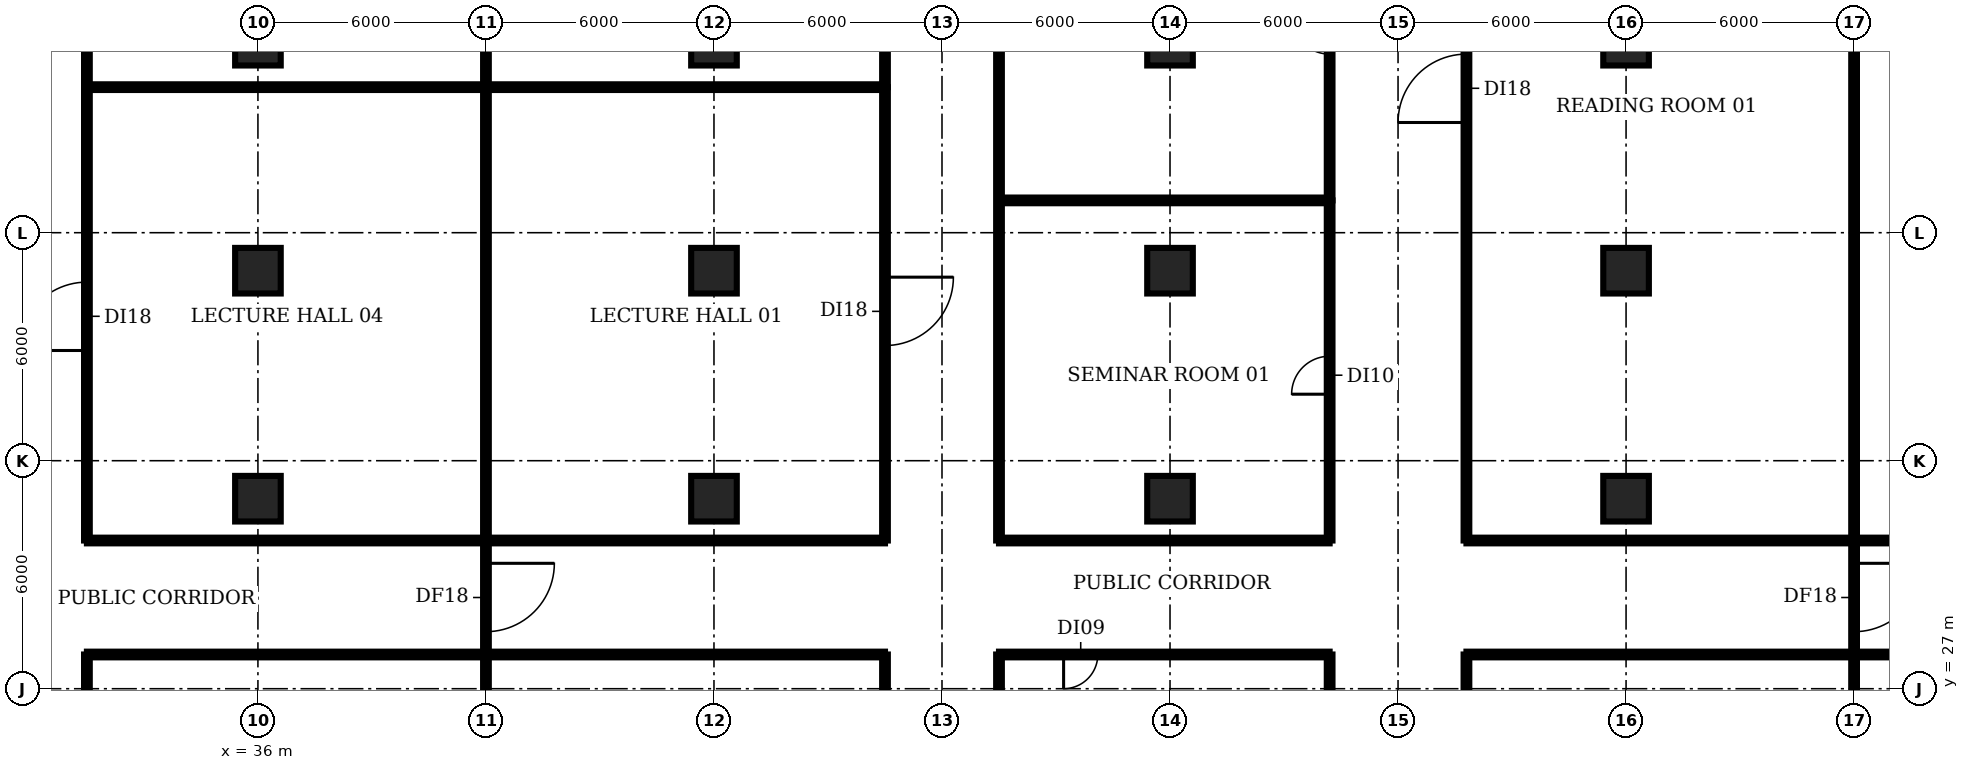
"""IFC4 building model, lengths in metres.
Left out: names, types, materials, properties, quantities, classifications, styles, units other than length and angle.
Written with IfcOpenShell. Run it as: python <this file> out.ifc"""

import sys

from ifc_helpers import new_model, si_unit, direction, frame, frame_2d, origin, origin_2d, place, context, subcontext, project, spatial, rectangle, extrude, element, fill, save


model = new_model("IFC4")
c1 = context("Model", 3, precision=1e-05, world=origin(), true_north=direction((0.0, 1.0)))
c2 = subcontext(c1, "Body", "Model", "MODEL_VIEW")
j1 = project(units=[si_unit("LENGTHUNIT", "METRE"), si_unit("PLANEANGLEUNIT", "RADIAN")], contexts=[c1])
p1 = place(None, origin())
s1 = spatial("IfcSite", under=j1, at=p1, CompositionType="ELEMENT")
p2 = place(p1, origin())
s2 = spatial("IfcBuilding", under=s1, at=p2, CompositionType="ELEMENT")
p3 = place(p2, frame((0.0, 0.0, 6.0)))
s3 = spatial("IfcBuildingStorey", under=s2, at=p3, CompositionType="ELEMENT", Elevation=6.0)
for number, where, z_axis, x_axis in (
    (1, (36.0, 32.0, 0.0), (0.0, 0.0, 1.0), (1.0, 0.0, 0.0)),
    (2, (36.0, 38.0, 0.0), (0.0, 0.0, 1.0), (1.0, 0.0, 0.0)),
    (3, (36.0, 44.0, 0.0), (0.0, 0.0, 1.0), (1.0, 0.0, 0.0)),
    (4, (48.0, 32.0, 0.0), (0.0, 0.0, 1.0), (1.0, 0.0, 0.0)),
    (5, (48.0, 38.0, 0.0), (0.0, 0.0, 1.0), (1.0, 0.0, 0.0)),
    (6, (48.0, 44.0, 0.0), (0.0, 0.0, 1.0), (1.0, 0.0, 0.0)),
    (7, (60.0, 32.0, 0.0), (0.0, 0.0, 1.0), (1.0, 0.0, 0.0)),
    (8, (60.0, 38.0, 0.0), (0.0, 0.0, 1.0), (1.0, 0.0, 0.0)),
    (9, (60.0, 44.0, 0.0), (0.0, 0.0, 1.0), (1.0, 0.0, 0.0)),
    (10, (72.0, 32.0, 0.0), (0.0, 0.0, 1.0), (1.0, 0.0, 0.0)),
    (11, (72.0, 38.0, 0.0), (0.0, 0.0, 1.0), (1.0, 0.0, 0.0)),
    (12, (72.0, 44.0, 0.0), (0.0, 0.0, 1.0), (1.0, 0.0, 0.0)),
):
    element("IfcColumn", number, at=place(p3, frame(where, z_axis=z_axis, x_axis=x_axis)), inside=s3, PredefinedType="COLUMN", context=c2, shape_type="SweptSolid", body=[
        extrude(rectangle(XDim=1.2, YDim=1.2, at=origin_2d()), origin(), (0.0, 0.0, 1.0), 4.6),
    ])
p4 = place(p3, frame((31.5, 19.52, 0.0), z_axis=(0.0, 0.0, 1.0), x_axis=(0.0, 1.0, 0.0)))
e13 = element("IfcWall", 13, at=p4, inside=s3, PredefinedType="PARTITIONING", context=c2, shape_type="SweptSolid", body=[
    extrude(rectangle(XDim=8.38, YDim=0.15, at=frame_2d((4.19, 0.0))), origin(), (0.0, 0.0, 1.0), 3.18),
])
p5 = place(p3, frame((31.5, 27.9, 0.0), z_axis=(0.0, 0.0, 1.0), x_axis=(1.0, 0.0, 0.0)))
e14 = element("IfcWall", 14, at=p5, inside=s3, PredefinedType="PARTITIONING", context=c2, shape_type="SweptSolid", body=[
    extrude(rectangle(XDim=21.0, YDim=0.15, at=frame_2d((10.5, 0.0))), origin(), (0.0, 0.0, 1.0), 3.18),
])
p6 = place(p3, frame((31.5, 30.9, 0.0), z_axis=(0.0, 0.0, 1.0), x_axis=(0.0, 1.0, 0.0)))
e15 = element("IfcWall", 15, at=p6, inside=s3, PredefinedType="PARTITIONING", context=c2, shape_type="SweptSolid", body=[
    extrude(rectangle(XDim=11.93, YDim=0.15, at=frame_2d((5.965, 0.0))), origin(), (0.0, 0.0, 1.0), 3.18),
])
p7 = place(p6, frame((5.0, 0.0, 0.0)))
e16 = element("IfcOpeningElement", 16, at=p7, cuts=e15, PredefinedType="OPENING", context=c2, shape_type="SweptSolid", body=[
    extrude(rectangle(XDim=1.8, YDim=2.1, at=frame_2d((0.9, 1.05))), frame((0.0, 0.085, 0.0), z_axis=(0.0, -1.0, 0.0), x_axis=(1.0, 0.0, 0.0)), (0.0, 0.0, 1.0), 0.17),
])
p8 = place(p3, frame((31.5, 30.9, 0.0), z_axis=(0.0, 0.0, 1.0), x_axis=(1.0, 0.0, 0.0)))
e17 = element("IfcWall", 17, at=p8, inside=s3, PredefinedType="PARTITIONING", context=c2, shape_type="SweptSolid", body=[
    extrude(rectangle(XDim=21.0, YDim=0.15, at=frame_2d((10.5, 0.0))), origin(), (0.0, 0.0, 1.0), 3.18),
])
p9 = place(p3, frame((31.5, 42.83, 0.0), z_axis=(0.0, 0.0, 1.0), x_axis=(0.0, 1.0, 0.0)))
e18 = element("IfcWall", 18, at=p9, inside=s3, PredefinedType="PARTITIONING", context=c2, shape_type="SweptSolid", body=[
    extrude(rectangle(XDim=11.94, YDim=0.15, at=frame_2d((5.97, 0.0))), origin(), (0.0, 0.0, 1.0), 3.18),
])
p10 = place(p9, frame((5.0, 0.0, 0.0)))
e19 = element("IfcOpeningElement", 19, at=p10, cuts=e18, PredefinedType="OPENING", context=c2, shape_type="SweptSolid", body=[
    extrude(rectangle(XDim=1.8, YDim=2.1, at=frame_2d((0.9, 1.05))), frame((0.0, 0.085, 0.0), z_axis=(0.0, -1.0, 0.0), x_axis=(1.0, 0.0, 0.0)), (0.0, 0.0, 1.0), 0.17),
])
p11 = place(p3, frame((31.5, 42.83, 0.0), z_axis=(0.0, 0.0, 1.0), x_axis=(1.0, 0.0, 0.0)))
e20 = element("IfcWall", 20, at=p11, inside=s3, PredefinedType="PARTITIONING", context=c2, shape_type="SweptSolid", body=[
    extrude(rectangle(XDim=21.0, YDim=0.15, at=frame_2d((10.5, 0.0))), origin(), (0.0, 0.0, 1.0), 3.18),
])
p12 = place(p3, frame((42.0, -4.5, 0.0), z_axis=(0.0, 0.0, 1.0), x_axis=(0.0, 1.0, 0.0)))
e21 = element("IfcWall", 21, at=p12, inside=s3, PredefinedType="PARTITIONING", context=c2, shape_type="SweptSolid", body=[
    extrude(rectangle(XDim=32.4, YDim=0.15, at=frame_2d((16.2, 0.0))), origin(), (0.0, 0.0, 1.0), 3.18),
])
p13 = place(p3, frame((42.0, 30.9, 0.0), z_axis=(0.0, 0.0, 1.0), x_axis=(0.0, -1.0, 0.0)))
e22 = element("IfcWall", 22, at=p13, inside=s3, PredefinedType="PARTITIONING", context=c2, shape_type="SweptSolid", body=[
    extrude(rectangle(XDim=3.0, YDim=0.15, at=frame_2d((1.5, 0.0))), origin(), (0.0, 0.0, 1.0), 3.18),
])
p14 = place(p13, frame((0.6, 0.0, 0.0)))
e23 = element("IfcOpeningElement", 23, at=p14, cuts=e22, PredefinedType="OPENING", context=c2, shape_type="SweptSolid", body=[
    extrude(rectangle(XDim=1.8, YDim=2.1, at=frame_2d((0.9, 1.05))), frame((0.0, 0.085, 0.0), z_axis=(0.0, -1.0, 0.0), x_axis=(1.0, 0.0, 0.0)), (0.0, 0.0, 1.0), 0.17),
])
p15 = place(p3, frame((42.0, 30.9, 0.0), z_axis=(0.0, 0.0, 1.0), x_axis=(0.0, 1.0, 0.0)))
e24 = element("IfcWall", 24, at=p15, inside=s3, PredefinedType="PARTITIONING", context=c2, shape_type="SweptSolid", body=[
    extrude(rectangle(XDim=31.58, YDim=0.15, at=frame_2d((15.79, 0.0))), origin(), (0.0, 0.0, 1.0), 3.18),
])
p16 = place(p3, frame((52.5, 27.9, 0.0), z_axis=(0.0, 0.0, 1.0), x_axis=(0.0, -1.0, 0.0)))
e25 = element("IfcWall", 25, at=p16, inside=s3, PredefinedType="PARTITIONING", context=c2, shape_type="SweptSolid", body=[
    extrude(rectangle(XDim=31.82, YDim=0.15, at=frame_2d((15.91, 0.0))), origin(), (0.0, 0.0, 1.0), 3.18),
])
p17 = place(p16, frame((14.9, 0.0, 0.0)))
e26 = element("IfcOpeningElement", 26, at=p17, cuts=e25, PredefinedType="OPENING", context=c2, shape_type="SweptSolid", body=[
    extrude(rectangle(XDim=1.8, YDim=2.1, at=frame_2d((0.9, 1.05))), frame((0.0, 0.085, 0.0), z_axis=(0.0, -1.0, 0.0), x_axis=(1.0, 0.0, 0.0)), (0.0, 0.0, 1.0), 0.17),
])
p18 = place(p3, frame((52.5, 42.83, 0.0), z_axis=(0.0, 0.0, 1.0), x_axis=(0.0, -1.0, 0.0)))
e27 = element("IfcWall", 27, at=p18, inside=s3, PredefinedType="PARTITIONING", context=c2, shape_type="SweptSolid", body=[
    extrude(rectangle(XDim=11.93, YDim=0.15, at=frame_2d((5.965, 0.0))), origin(), (0.0, 0.0, 1.0), 3.18),
])
p19 = place(p18, frame((5.0, 0.0, 0.0)))
e28 = element("IfcOpeningElement", 28, at=p19, cuts=e27, PredefinedType="OPENING", context=c2, shape_type="SweptSolid", body=[
    extrude(rectangle(XDim=1.8, YDim=2.1, at=frame_2d((0.9, 1.05))), frame((0.0, 0.085, 0.0), z_axis=(0.0, -1.0, 0.0), x_axis=(1.0, 0.0, 0.0)), (0.0, 0.0, 1.0), 0.17),
])
p20 = place(p3, frame((52.5, 54.77, 0.0), z_axis=(0.0, 0.0, 1.0), x_axis=(0.0, -1.0, 0.0)))
e29 = element("IfcWall", 29, at=p20, inside=s3, PredefinedType="PARTITIONING", context=c2, shape_type="SweptSolid", body=[
    extrude(rectangle(XDim=11.94, YDim=0.15, at=frame_2d((5.97, 0.0))), origin(), (0.0, 0.0, 1.0), 3.18),
])
p21 = place(p20, frame((5.0, 0.0, 0.0)))
e30 = element("IfcOpeningElement", 30, at=p21, cuts=e29, PredefinedType="OPENING", context=c2, shape_type="SweptSolid", body=[
    extrude(rectangle(XDim=1.8, YDim=2.1, at=frame_2d((0.9, 1.05))), frame((0.0, 0.085, 0.0), z_axis=(0.0, -1.0, 0.0), x_axis=(1.0, 0.0, 0.0)), (0.0, 0.0, 1.0), 0.17),
])
p22 = place(p3, frame((55.5, 21.54, 0.0), z_axis=(0.0, 0.0, 1.0), x_axis=(0.0, 1.0, 0.0)))
e31 = element("IfcWall", 31, at=p22, inside=s3, PredefinedType="PARTITIONING", context=c2, shape_type="SweptSolid", body=[
    extrude(rectangle(XDim=6.36, YDim=0.15, at=frame_2d((3.18, 0.0))), origin(), (0.0, 0.0, 1.0), 3.18),
])
p23 = place(p3, frame((55.5, 30.9, 0.0), z_axis=(0.0, 0.0, 1.0), x_axis=(0.0, 1.0, 0.0)))
e32 = element("IfcWall", 32, at=p23, inside=s3, PredefinedType="PARTITIONING", context=c2, shape_type="SweptSolid", body=[
    extrude(rectangle(XDim=35.8, YDim=0.15, at=frame_2d((17.9, 0.0))), origin(), (0.0, 0.0, 1.0), 3.18),
])
for number, where, z_axis, x_axis in (
    (33, (55.5, 30.9, 0.0), (0.0, 0.0, 1.0), (1.0, 0.0, 0.0)),
    (34, (55.5, 39.85, 0.0), (0.0, 0.0, 1.0), (1.0, 0.0, 0.0)),
):
    element("IfcWall", number, at=place(p3, frame(where, z_axis=z_axis, x_axis=x_axis)), inside=s3, PredefinedType="PARTITIONING", context=c2, shape_type="SweptSolid", body=[
        extrude(rectangle(XDim=8.7, YDim=0.15, at=frame_2d((4.35, 0.0))), origin(), (0.0, 0.0, 1.0), 3.18),
    ])
p24 = place(p3, frame((64.2, 24.16, 0.0), z_axis=(0.0, 0.0, 1.0), x_axis=(0.0, 1.0, 0.0)))
e35 = element("IfcWall", 35, at=p24, inside=s3, PredefinedType="PARTITIONING", context=c2, shape_type="SweptSolid", body=[
    extrude(rectangle(XDim=3.74, YDim=0.15, at=frame_2d((1.87, 0.0))), origin(), (0.0, 0.0, 1.0), 3.18),
])
p25 = place(p3, frame((64.2, 27.9, 0.0), z_axis=(0.0, 0.0, 1.0), x_axis=(-1.0, 0.0, 0.0)))
e36 = element("IfcWall", 36, at=p25, inside=s3, PredefinedType="PARTITIONING", context=c2, shape_type="SweptSolid", body=[
    extrude(rectangle(XDim=8.7, YDim=0.15, at=frame_2d((4.35, 0.0))), origin(), (0.0, 0.0, 1.0), 3.18),
])
p26 = place(p25, frame((6.1, 0.0, 0.0)))
e37 = element("IfcOpeningElement", 37, at=p26, cuts=e36, PredefinedType="OPENING", context=c2, shape_type="SweptSolid", body=[
    extrude(rectangle(XDim=0.9, YDim=2.1, at=frame_2d((0.45, 1.05))), frame((0.0, 0.085, 0.0), z_axis=(0.0, -1.0, 0.0), x_axis=(1.0, 0.0, 0.0)), (0.0, 0.0, 1.0), 0.17),
])
p27 = place(p3, frame((64.2, 30.9, 0.0), z_axis=(0.0, 0.0, 1.0), x_axis=(0.0, 1.0, 0.0)))
e38 = element("IfcWall", 38, at=p27, inside=s3, PredefinedType="PARTITIONING", context=c2, shape_type="SweptSolid", body=[
    extrude(rectangle(XDim=8.95, YDim=0.15, at=frame_2d((4.475, 0.0))), origin(), (0.0, 0.0, 1.0), 3.18),
])
p28 = place(p27, frame((3.85, 0.0, 0.0)))
e39 = element("IfcOpeningElement", 39, at=p28, cuts=e38, PredefinedType="OPENING", context=c2, shape_type="SweptSolid", body=[
    extrude(rectangle(XDim=1.0, YDim=2.1, at=frame_2d((0.5, 1.05))), frame((0.0, 0.085, 0.0), z_axis=(0.0, -1.0, 0.0), x_axis=(1.0, 0.0, 0.0)), (0.0, 0.0, 1.0), 0.17),
])
p29 = place(p3, frame((64.2, 39.85, 0.0), z_axis=(0.0, 0.0, 1.0), x_axis=(0.0, 1.0, 0.0)))
e40 = element("IfcWall", 40, at=p29, inside=s3, PredefinedType="PARTITIONING", context=c2, shape_type="SweptSolid", body=[
    extrude(rectangle(XDim=8.95, YDim=0.15, at=frame_2d((4.475, 0.0))), origin(), (0.0, 0.0, 1.0), 3.18),
])
p30 = place(p29, frame((3.85, 0.0, 0.0)))
e41 = element("IfcOpeningElement", 41, at=p30, cuts=e40, PredefinedType="OPENING", context=c2, shape_type="SweptSolid", body=[
    extrude(rectangle(XDim=1.0, YDim=2.1, at=frame_2d((0.5, 1.05))), frame((0.0, 0.085, 0.0), z_axis=(0.0, -1.0, 0.0), x_axis=(1.0, 0.0, 0.0)), (0.0, 0.0, 1.0), 0.17),
])
p31 = place(p3, frame((67.8, 27.9, 0.0), z_axis=(0.0, 0.0, 1.0), x_axis=(0.0, -1.0, 0.0)))
e42 = element("IfcWall", 42, at=p31, inside=s3, PredefinedType="PARTITIONING", context=c2, shape_type="SweptSolid", body=[
    extrude(rectangle(XDim=11.61, YDim=0.15, at=frame_2d((5.805, 0.0))), origin(), (0.0, 0.0, 1.0), 3.18),
])
p32 = place(p31, frame((5.11, 0.0, 0.0)))
e43 = element("IfcOpeningElement", 43, at=p32, cuts=e42, PredefinedType="OPENING", context=c2, shape_type="SweptSolid", body=[
    extrude(rectangle(XDim=1.2, YDim=2.1, at=frame_2d((0.6, 1.05))), frame((0.0, 0.085, 0.0), z_axis=(0.0, -1.0, 0.0), x_axis=(1.0, 0.0, 0.0)), (0.0, 0.0, 1.0), 0.17),
])
p33 = place(p3, frame((67.8, 27.9, 0.0), z_axis=(0.0, 0.0, 1.0), x_axis=(1.0, 0.0, 0.0)))
e44 = element("IfcWall", 44, at=p33, inside=s3, PredefinedType="PARTITIONING", context=c2, shape_type="SweptSolid", body=[
    extrude(rectangle(XDim=10.2, YDim=0.15, at=frame_2d((5.1, 0.0))), origin(), (0.0, 0.0, 1.0), 3.18),
])
p34 = place(p3, frame((67.8, 30.9, 0.0), z_axis=(0.0, 0.0, 1.0), x_axis=(0.0, 1.0, 0.0)))
e45 = element("IfcWall", 45, at=p34, inside=s3, PredefinedType="PARTITIONING", context=c2, shape_type="SweptSolid", body=[
    extrude(rectangle(XDim=23.87, YDim=0.15, at=frame_2d((11.935, 0.0))), origin(), (0.0, 0.0, 1.0), 3.18),
])
p35 = place(p34, frame((11.0, 0.0, 0.0)))
e46 = element("IfcOpeningElement", 46, at=p35, cuts=e45, PredefinedType="OPENING", context=c2, shape_type="SweptSolid", body=[
    extrude(rectangle(XDim=1.8, YDim=2.1, at=frame_2d((0.9, 1.05))), frame((0.0, 0.085, 0.0), z_axis=(0.0, -1.0, 0.0), x_axis=(1.0, 0.0, 0.0)), (0.0, 0.0, 1.0), 0.17),
])
p36 = place(p3, frame((67.8, 30.9, 0.0), z_axis=(0.0, 0.0, 1.0), x_axis=(1.0, 0.0, 0.0)))
e47 = element("IfcWall", 47, at=p36, inside=s3, PredefinedType="PARTITIONING", context=c2, shape_type="SweptSolid", body=[
    extrude(rectangle(XDim=10.2, YDim=0.15, at=frame_2d((5.1, 0.0))), origin(), (0.0, 0.0, 1.0), 3.18),
])
p37 = place(p3, frame((78.0, -3.92, 0.0), z_axis=(0.0, 0.0, 1.0), x_axis=(0.0, 1.0, 0.0)))
e48 = element("IfcWall", 48, at=p37, inside=s3, PredefinedType="PARTITIONING", context=c2, shape_type="SweptSolid", body=[
    extrude(rectangle(XDim=31.82, YDim=0.15, at=frame_2d((15.91, 0.0))), origin(), (0.0, 0.0, 1.0), 3.18),
])
p38 = place(p3, frame((78.0, 30.9, 0.0), z_axis=(0.0, 0.0, 1.0), x_axis=(0.0, -1.0, 0.0)))
e49 = element("IfcWall", 49, at=p38, inside=s3, PredefinedType="PARTITIONING", context=c2, shape_type="SweptSolid", body=[
    extrude(rectangle(XDim=3.0, YDim=0.15, at=frame_2d((1.5, 0.0))), origin(), (0.0, 0.0, 1.0), 3.18),
])
p39 = place(p38, frame((0.6, 0.0, 0.0)))
e50 = element("IfcOpeningElement", 50, at=p39, cuts=e49, PredefinedType="OPENING", context=c2, shape_type="SweptSolid", body=[
    extrude(rectangle(XDim=1.8, YDim=2.1, at=frame_2d((0.9, 1.05))), frame((0.0, 0.085, 0.0), z_axis=(0.0, -1.0, 0.0), x_axis=(1.0, 0.0, 0.0)), (0.0, 0.0, 1.0), 0.17),
])
p40 = place(p3, frame((78.0, 30.9, 0.0), z_axis=(0.0, 0.0, 1.0), x_axis=(0.0, 1.0, 0.0)))
e51 = element("IfcWall", 51, at=p40, inside=s3, PredefinedType="PARTITIONING", context=c2, shape_type="SweptSolid", body=[
    extrude(rectangle(XDim=35.8, YDim=0.15, at=frame_2d((17.9, 0.0))), origin(), (0.0, 0.0, 1.0), 3.18),
])
p41 = place(p3, frame((78.0, 30.9, 0.0), z_axis=(0.0, 0.0, 1.0), x_axis=(1.0, 0.0, 0.0)))
e52 = element("IfcWall", 52, at=p41, inside=s3, PredefinedType="PARTITIONING", context=c2, shape_type="SweptSolid", body=[
    extrude(rectangle(XDim=15.7, YDim=0.15, at=frame_2d((7.85, 0.0))), origin(), (0.0, 0.0, 1.0), 3.18),
])
p42 = place(p41, frame((8.3, 0.0, 0.0)))
e53 = element("IfcOpeningElement", 53, at=p42, cuts=e52, PredefinedType="OPENING", context=c2, shape_type="SweptSolid", body=[
    extrude(rectangle(XDim=1.2, YDim=2.1, at=frame_2d((0.6, 1.05))), frame((0.0, 0.085, 0.0), z_axis=(0.0, -1.0, 0.0), x_axis=(1.0, 0.0, 0.0)), (0.0, 0.0, 1.0), 0.17),
])
p43 = place(p3, frame((93.7, 27.9, 0.0), z_axis=(0.0, 0.0, 1.0), x_axis=(-1.0, 0.0, 0.0)))
e54 = element("IfcWall", 54, at=p43, inside=s3, PredefinedType="PARTITIONING", context=c2, shape_type="SweptSolid", body=[
    extrude(rectangle(XDim=15.7, YDim=0.15, at=frame_2d((7.85, 0.0))), origin(), (0.0, 0.0, 1.0), 3.18),
])
p44 = place(p43, frame((6.5, 0.0, 0.0)))
e55 = element("IfcOpeningElement", 55, at=p44, cuts=e54, PredefinedType="OPENING", context=c2, shape_type="SweptSolid", body=[
    extrude(rectangle(XDim=1.2, YDim=2.1, at=frame_2d((0.6, 1.05))), frame((0.0, 0.085, 0.0), z_axis=(0.0, -1.0, 0.0), x_axis=(1.0, 0.0, 0.0)), (0.0, 0.0, 1.0), 0.17),
])
p45 = place(p7, origin())
e56 = element("IfcDoor", 56, at=p45, inside=s3, OperationType="SINGLE_SWING_LEFT", PredefinedType="DOOR", context=c2, shape_type="SweptSolid", body=[
    extrude(rectangle(XDim=1.8, YDim=2.1, at=frame_2d((0.9, 1.05))), frame((0.0, 0.025, 0.0), z_axis=(0.0, -1.0, 0.0), x_axis=(1.0, 0.0, 0.0)), (0.0, 0.0, 1.0), 0.05),
])
fill(e16, e56)
p46 = place(p14, origin())
e57 = element("IfcDoor", 57, at=p46, inside=s3, OperationType="SINGLE_SWING_LEFT", PredefinedType="DOOR", context=c2, shape_type="SweptSolid", body=[
    extrude(rectangle(XDim=1.8, YDim=2.1, at=frame_2d((0.9, 1.05))), frame((0.0, 0.025, 0.0), z_axis=(0.0, -1.0, 0.0), x_axis=(1.0, 0.0, 0.0)), (0.0, 0.0, 1.0), 0.05),
])
fill(e23, e57)
p47 = place(p19, origin())
e58 = element("IfcDoor", 58, at=p47, inside=s3, OperationType="SINGLE_SWING_LEFT", PredefinedType="DOOR", context=c2, shape_type="SweptSolid", body=[
    extrude(rectangle(XDim=1.8, YDim=2.1, at=frame_2d((0.9, 1.05))), frame((0.0, 0.025, 0.0), z_axis=(0.0, -1.0, 0.0), x_axis=(1.0, 0.0, 0.0)), (0.0, 0.0, 1.0), 0.05),
])
fill(e28, e58)
p48 = place(p26, origin())
e59 = element("IfcDoor", 59, at=p48, inside=s3, OperationType="SINGLE_SWING_RIGHT", PredefinedType="DOOR", context=c2, shape_type="SweptSolid", body=[
    extrude(rectangle(XDim=0.9, YDim=2.1, at=frame_2d((0.45, 1.05))), frame((0.0, 0.025, 0.0), z_axis=(0.0, -1.0, 0.0), x_axis=(1.0, 0.0, 0.0)), (0.0, 0.0, 1.0), 0.05),
])
fill(e37, e59)
p49 = place(p28, origin())
e60 = element("IfcDoor", 60, at=p49, inside=s3, OperationType="SINGLE_SWING_LEFT", PredefinedType="DOOR", context=c2, shape_type="SweptSolid", body=[
    extrude(rectangle(XDim=1.0, YDim=2.1, at=frame_2d((0.5, 1.05))), frame((0.0, 0.025, 0.0), z_axis=(0.0, -1.0, 0.0), x_axis=(1.0, 0.0, 0.0)), (0.0, 0.0, 1.0), 0.05),
])
fill(e39, e60)
p50 = place(p30, origin())
e61 = element("IfcDoor", 61, at=p50, inside=s3, OperationType="SINGLE_SWING_RIGHT", PredefinedType="DOOR", context=c2, shape_type="SweptSolid", body=[
    extrude(rectangle(XDim=1.0, YDim=2.1, at=frame_2d((0.5, 1.05))), frame((0.0, 0.025, 0.0), z_axis=(0.0, -1.0, 0.0), x_axis=(1.0, 0.0, 0.0)), (0.0, 0.0, 1.0), 0.05),
])
fill(e41, e61)
p51 = place(p35, origin())
e62 = element("IfcDoor", 62, at=p51, inside=s3, OperationType="SINGLE_SWING_LEFT", PredefinedType="DOOR", context=c2, shape_type="SweptSolid", body=[
    extrude(rectangle(XDim=1.8, YDim=2.1, at=frame_2d((0.9, 1.05))), frame((0.0, 0.025, 0.0), z_axis=(0.0, -1.0, 0.0), x_axis=(1.0, 0.0, 0.0)), (0.0, 0.0, 1.0), 0.05),
])
fill(e46, e62)
p52 = place(p39, origin())
e63 = element("IfcDoor", 63, at=p52, inside=s3, OperationType="SINGLE_SWING_LEFT", PredefinedType="DOOR", context=c2, shape_type="SweptSolid", body=[
    extrude(rectangle(XDim=1.8, YDim=2.1, at=frame_2d((0.9, 1.05))), frame((0.0, 0.025, 0.0), z_axis=(0.0, -1.0, 0.0), x_axis=(1.0, 0.0, 0.0)), (0.0, 0.0, 1.0), 0.05),
])
fill(e50, e63)
save(model, sys.argv[1])
